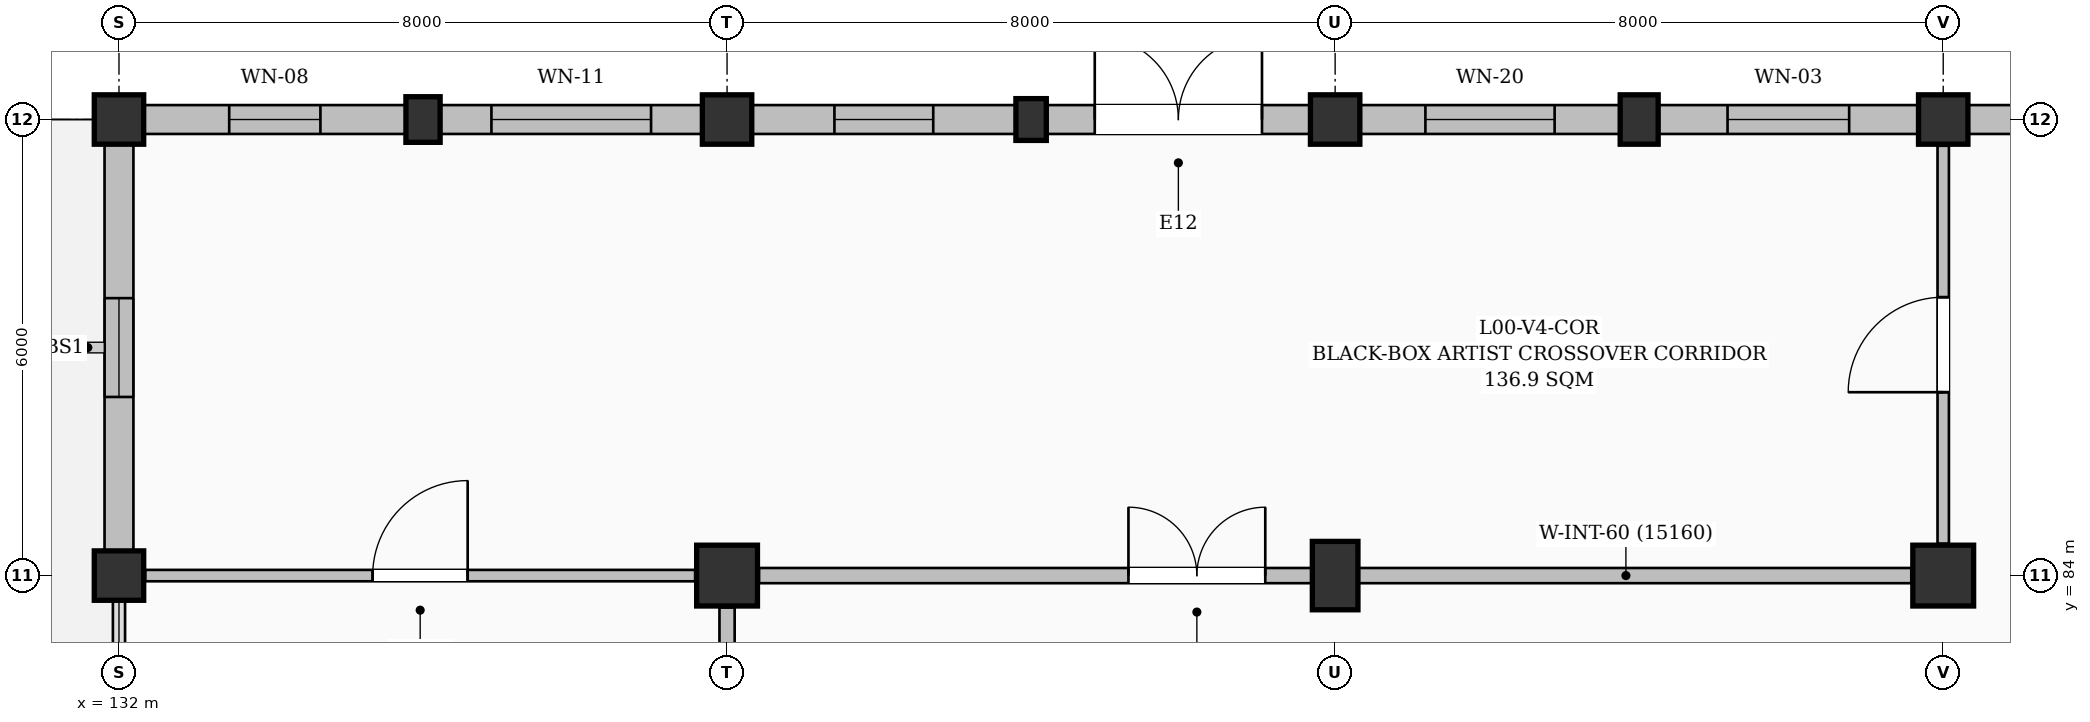
"""IFC4 building model, lengths in metres.
Left out: names, types, materials, properties, quantities, classifications, styles, units other than length and angle.
Written with IfcOpenShell. Run it as: python <this file> out.ifc"""

import sys

from ifc_helpers import new_model, si_unit, direction, frame, frame_2d, origin, origin_2d, place, context, subcontext, project, spatial, rectangle, extrude, element, fill, save


model = new_model("IFC4")
c1 = context("Model", 3, precision=1e-05, world=origin(), true_north=direction((0.0, 1.0)))
c2 = subcontext(c1, "Body", "Model", "MODEL_VIEW")
j1 = project(units=[si_unit("LENGTHUNIT", "METRE"), si_unit("PLANEANGLEUNIT", "RADIAN")], contexts=[c1])
p1 = place(None, origin())
s1 = spatial("IfcSite", under=j1, at=p1, CompositionType="ELEMENT")
p2 = place(p1, origin())
s2 = spatial("IfcBuilding", under=s1, at=p2, CompositionType="ELEMENT")
p3 = place(p2, origin())
s3 = spatial("IfcBuildingStorey", under=s2, at=p3, CompositionType="ELEMENT", Elevation=0.0)
for number, where, z_axis, x_axis in (
    (1, (132.0, 84.0, 0.0), (0.0, 0.0, 1.0), (1.0, 0.0, 0.0)),
    (2, (132.0, 90.0, 0.0), (0.0, 0.0, 1.0), (1.0, 0.0, 0.0)),
):
    element("IfcColumn", number, at=place(p3, frame(where, z_axis=z_axis, x_axis=x_axis)), inside=s3, PredefinedType="COLUMN", context=c2, shape_type="SweptSolid", body=[
        extrude(rectangle(XDim=0.65, YDim=0.65, at=origin_2d()), origin(), (0.0, 0.0, 1.0), 4.8),
    ])
p4 = place(p3, frame((136.0, 90.0, 0.0), z_axis=(0.0, 0.0, 1.0), x_axis=(1.0, 0.0, 0.0)))
e3 = element("IfcColumn", 3, at=p4, inside=s3, PredefinedType="PILASTER", context=c2, shape_type="SweptSolid", body=[
    extrude(rectangle(XDim=0.45, YDim=0.6, at=origin_2d()), origin(), (0.0, 0.0, 1.0), 4.8),
])
p5 = place(p3, frame((140.0, 84.0, 0.0), z_axis=(0.0, 0.0, 1.0), x_axis=(1.0, 0.0, 0.0)))
e4 = element("IfcColumn", 4, at=p5, inside=s3, PredefinedType="COLUMN", context=c2, shape_type="SweptSolid", body=[
    extrude(rectangle(XDim=0.8, YDim=0.8, at=origin_2d()), origin(), (0.0, 0.0, 1.0), 4.8),
])
p6 = place(p3, frame((140.0, 90.0, 0.0), z_axis=(0.0, 0.0, 1.0), x_axis=(1.0, 0.0, 0.0)))
e5 = element("IfcColumn", 5, at=p6, inside=s3, PredefinedType="COLUMN", context=c2, shape_type="SweptSolid", body=[
    extrude(rectangle(XDim=0.65, YDim=0.65, at=origin_2d()), origin(), (0.0, 0.0, 1.0), 4.8),
])
p7 = place(p3, frame((144.0, 90.0, 0.0), z_axis=(0.0, 0.0, 1.0), x_axis=(1.0, 0.0, 0.0)))
e6 = element("IfcColumn", 6, at=p7, inside=s3, PredefinedType="PILASTER", context=c2, shape_type="SweptSolid", body=[
    extrude(rectangle(XDim=0.4, YDim=0.55, at=origin_2d()), origin(), (0.0, 0.0, 1.0), 4.8),
])
p8 = place(p3, frame((148.0, 84.0, 0.0), z_axis=(0.0, 0.0, 1.0), x_axis=(1.0, 0.0, 0.0)))
e7 = element("IfcColumn", 7, at=p8, inside=s3, PredefinedType="COLUMN", context=c2, shape_type="SweptSolid", body=[
    extrude(rectangle(XDim=0.6, YDim=0.9, at=origin_2d()), origin(), (0.0, 0.0, 1.0), 4.8),
])
p9 = place(p3, frame((148.0, 90.0, 0.0), z_axis=(0.0, 0.0, 1.0), x_axis=(1.0, 0.0, 0.0)))
e8 = element("IfcColumn", 8, at=p9, inside=s3, PredefinedType="COLUMN", context=c2, shape_type="SweptSolid", body=[
    extrude(rectangle(XDim=0.65, YDim=0.65, at=origin_2d()), origin(), (0.0, 0.0, 1.0), 4.8),
])
p10 = place(p3, frame((152.0, 90.0, 0.0), z_axis=(0.0, 0.0, 1.0), x_axis=(1.0, 0.0, 0.0)))
e9 = element("IfcColumn", 9, at=p10, inside=s3, PredefinedType="PILASTER", context=c2, shape_type="SweptSolid", body=[
    extrude(rectangle(XDim=0.5, YDim=0.65, at=origin_2d()), origin(), (0.0, 0.0, 1.0), 4.8),
])
p11 = place(p3, frame((156.0, 84.0, 0.0), z_axis=(0.0, 0.0, 1.0), x_axis=(1.0, 0.0, 0.0)))
e10 = element("IfcColumn", 10, at=p11, inside=s3, PredefinedType="COLUMN", context=c2, shape_type="SweptSolid", body=[
    extrude(rectangle(XDim=0.8, YDim=0.8, at=origin_2d()), origin(), (0.0, 0.0, 1.0), 4.8),
])
p12 = place(p3, frame((156.0, 90.0, 0.0), z_axis=(0.0, 0.0, 1.0), x_axis=(1.0, 0.0, 0.0)))
e11 = element("IfcColumn", 11, at=p12, inside=s3, PredefinedType="COLUMN", context=c2, shape_type="SweptSolid", body=[
    extrude(rectangle(XDim=0.65, YDim=0.65, at=origin_2d()), origin(), (0.0, 0.0, 1.0), 4.8),
])
p13 = place(p3, frame((132.0, 84.325, 0.0), z_axis=(0.0, 0.0, 1.0), x_axis=(0.0, 1.0, 0.0)))
e12 = element("IfcWall", 12, at=p13, inside=s3, PredefinedType="SOLIDWALL", context=c2, shape_type="SweptSolid", body=[
    extrude(rectangle(XDim=5.35, YDim=0.38, at=frame_2d((2.675, 0.0))), origin(), (0.0, 0.0, 1.0), 4.335),
])
p14 = place(p13, frame((2.025, 0.0, 0.95)))
e13 = element("IfcOpeningElement", 13, at=p14, cuts=e12, PredefinedType="OPENING", context=c2, shape_type="SweptSolid", body=[
    extrude(rectangle(XDim=1.3, YDim=1.4, at=frame_2d((0.65, 0.7))), frame((0.0, 0.2, 0.0), z_axis=(0.0, -1.0, 0.0), x_axis=(1.0, 0.0, 0.0)), (0.0, 0.0, 1.0), 0.4),
])
p15 = place(p3, frame((132.325, 90.0, 0.0), z_axis=(0.0, 0.0, 1.0), x_axis=(1.0, 0.0, 0.0)))
e14 = element("IfcWall", 14, at=p15, inside=s3, PredefinedType="SOLIDWALL", context=c2, shape_type="SweptSolid", body=[
    extrude(rectangle(XDim=3.45, YDim=0.38, at=frame_2d((1.725, 0.0))), origin(), (0.0, 0.0, 1.0), 4.035),
])
p16 = place(p15, frame((1.125, 0.0, 0.95)))
e15 = element("IfcOpeningElement", 15, at=p16, cuts=e14, PredefinedType="OPENING", context=c2, shape_type="SweptSolid", body=[
    extrude(rectangle(XDim=1.2, YDim=1.5, at=frame_2d((0.6, 0.75))), frame((0.0, 0.2, 0.0), z_axis=(0.0, -1.0, 0.0), x_axis=(1.0, 0.0, 0.0)), (0.0, 0.0, 1.0), 0.4),
])
p17 = place(p3, frame((136.225, 90.0, 0.0), z_axis=(0.0, 0.0, 1.0), x_axis=(1.0, 0.0, 0.0)))
e16 = element("IfcWall", 16, at=p17, inside=s3, PredefinedType="SOLIDWALL", context=c2, shape_type="SweptSolid", body=[
    extrude(rectangle(XDim=3.45, YDim=0.38, at=frame_2d((1.725, 0.0))), origin(), (0.0, 0.0, 1.0), 4.035),
])
p18 = place(p17, frame((0.675, 0.0, 0.95)))
e17 = element("IfcOpeningElement", 17, at=p18, cuts=e16, PredefinedType="OPENING", context=c2, shape_type="SweptSolid", body=[
    extrude(rectangle(XDim=2.1, YDim=1.5, at=frame_2d((1.05, 0.75))), frame((0.0, 0.2, 0.0), z_axis=(0.0, -1.0, 0.0), x_axis=(1.0, 0.0, 0.0)), (0.0, 0.0, 1.0), 0.4),
])
p19 = place(p3, frame((140.325, 90.0, 0.0), z_axis=(0.0, 0.0, 1.0), x_axis=(1.0, 0.0, 0.0)))
e18 = element("IfcWall", 18, at=p19, inside=s3, PredefinedType="SOLIDWALL", context=c2, shape_type="SweptSolid", body=[
    extrude(rectangle(XDim=3.475, YDim=0.38, at=frame_2d((1.738, 0.0))), origin(), (0.0, 0.0, 1.0), 3.985),
])
p20 = place(p19, frame((1.087, 0.0, 0.95)))
e19 = element("IfcOpeningElement", 19, at=p20, cuts=e18, PredefinedType="OPENING", context=c2, shape_type="SweptSolid", body=[
    extrude(rectangle(XDim=1.3, YDim=1.4, at=frame_2d((0.65, 0.7))), frame((0.0, 0.2, 0.0), z_axis=(0.0, -1.0, 0.0), x_axis=(1.0, 0.0, 0.0)), (0.0, 0.0, 1.0), 0.4),
])
p21 = place(p3, frame((144.2, 90.0, 0.0), z_axis=(0.0, 0.0, 1.0), x_axis=(1.0, 0.0, 0.0)))
e20 = element("IfcWall", 20, at=p21, inside=s3, PredefinedType="SOLIDWALL", context=c2, shape_type="SweptSolid", body=[
    extrude(rectangle(XDim=3.475, YDim=0.38, at=frame_2d((1.738, 0.0))), origin(), (0.0, 0.0, 1.0), 3.985),
])
p22 = place(p21, frame((0.637, 0.0, 0.0)))
e21 = element("IfcOpeningElement", 21, at=p22, cuts=e20, PredefinedType="OPENING", context=c2, shape_type="SweptSolid", body=[
    extrude(rectangle(XDim=2.2, YDim=2.4, at=frame_2d((1.1, 1.2))), frame((0.0, 0.2, 0.0), z_axis=(0.0, -1.0, 0.0), x_axis=(1.0, 0.0, 0.0)), (0.0, 0.0, 1.0), 0.4),
])
p23 = place(p3, frame((148.325, 90.0, 0.0), z_axis=(0.0, 0.0, 1.0), x_axis=(1.0, 0.0, 0.0)))
e22 = element("IfcWall", 22, at=p23, inside=s3, PredefinedType="SOLIDWALL", context=c2, shape_type="SweptSolid", body=[
    extrude(rectangle(XDim=3.425, YDim=0.38, at=frame_2d((1.712, 0.0))), origin(), (0.0, 0.0, 1.0), 3.935),
])
p24 = place(p23, frame((0.863, 0.0, 0.95)))
e23 = element("IfcOpeningElement", 23, at=p24, cuts=e22, PredefinedType="OPENING", context=c2, shape_type="SweptSolid", body=[
    extrude(rectangle(XDim=1.7, YDim=2.0, at=frame_2d((0.85, 1.0))), frame((0.0, 0.2, 0.0), z_axis=(0.0, -1.0, 0.0), x_axis=(1.0, 0.0, 0.0)), (0.0, 0.0, 1.0), 0.4),
])
p25 = place(p3, frame((152.25, 90.0, 0.0), z_axis=(0.0, 0.0, 1.0), x_axis=(1.0, 0.0, 0.0)))
e24 = element("IfcWall", 24, at=p25, inside=s3, PredefinedType="SOLIDWALL", context=c2, shape_type="SweptSolid", body=[
    extrude(rectangle(XDim=3.425, YDim=0.38, at=frame_2d((1.712, 0.0))), origin(), (0.0, 0.0, 1.0), 3.935),
])
p26 = place(p25, frame((0.913, 0.0, 0.95)))
e25 = element("IfcOpeningElement", 25, at=p26, cuts=e24, PredefinedType="OPENING", context=c2, shape_type="SweptSolid", body=[
    extrude(rectangle(XDim=1.6, YDim=1.8, at=frame_2d((0.8, 0.9))), frame((0.0, 0.2, 0.0), z_axis=(0.0, -1.0, 0.0), x_axis=(1.0, 0.0, 0.0)), (0.0, 0.0, 1.0), 0.4),
])
p27 = place(p3, frame((156.325, 90.0, 0.0), z_axis=(0.0, 0.0, 1.0), x_axis=(1.0, 0.0, 0.0)))
e26 = element("IfcWall", 26, at=p27, inside=s3, PredefinedType="SOLIDWALL", context=c2, shape_type="SweptSolid", body=[
    extrude(rectangle(XDim=3.45, YDim=0.38, at=frame_2d((1.725, 0.0))), origin(), (0.0, 0.0, 1.0), 4.235),
])
p28 = place(p27, frame((0.625, 0.0, 0.95)))
e27 = element("IfcOpeningElement", 27, at=p28, cuts=e26, PredefinedType="OPENING", context=c2, shape_type="SweptSolid", body=[
    extrude(rectangle(XDim=2.2, YDim=1.8, at=frame_2d((1.1, 0.9))), frame((0.0, 0.2, 0.0), z_axis=(0.0, -1.0, 0.0), x_axis=(1.0, 0.0, 0.0)), (0.0, 0.0, 1.0), 0.4),
])
p29 = place(p3, frame((140.0, 68.42, 0.0), z_axis=(0.0, 0.0, 1.0), x_axis=(0.0, 1.0, 0.0)))
e28 = element("IfcWall", 28, at=p29, inside=s3, PredefinedType="PARTITIONING", context=c2, shape_type="SweptSolid", body=[
    extrude(rectangle(XDim=15.16, YDim=0.2, at=frame_2d((7.58, 0.0))), origin(), (0.0, 0.0, 1.0), 4.085),
])
p30 = place(p29, frame((4.861, 0.0, 0.0)))
e29 = element("IfcOpeningElement", 29, at=p30, cuts=e28, PredefinedType="OPENING", context=c2, shape_type="SweptSolid", body=[
    extrude(rectangle(XDim=1.8, YDim=2.35, at=frame_2d((0.9, 1.175))), frame((0.0, 0.11, 0.0), z_axis=(0.0, -1.0, 0.0), x_axis=(1.0, 0.0, 0.0)), (0.0, 0.0, 1.0), 0.22),
])
p31 = place(p3, frame((140.42, 84.0, 0.0), z_axis=(0.0, 0.0, 1.0), x_axis=(1.0, 0.0, 0.0)))
e30 = element("IfcWall", 30, at=p31, inside=s3, PredefinedType="PARTITIONING", context=c2, shape_type="SweptSolid", body=[
    extrude(rectangle(XDim=15.16, YDim=0.2, at=frame_2d((7.58, 0.0))), origin(), (0.0, 0.0, 1.0), 3.685),
])
p32 = place(p31, frame((4.861, 0.0, 0.0)))
e31 = element("IfcOpeningElement", 31, at=p32, cuts=e30, PredefinedType="OPENING", context=c2, shape_type="SweptSolid", body=[
    extrude(rectangle(XDim=1.8, YDim=2.35, at=frame_2d((0.9, 1.175))), frame((0.0, 0.11, 0.0), z_axis=(0.0, -1.0, 0.0), x_axis=(1.0, 0.0, 0.0)), (0.0, 0.0, 1.0), 0.22),
])
p33 = place(p3, frame((132.345, 84.0, 0.0), z_axis=(0.0, 0.0, 1.0), x_axis=(1.0, 0.0, 0.0)))
e32 = element("IfcWall", 32, at=p33, inside=s3, PredefinedType="PARTITIONING", context=c2, shape_type="SweptSolid", body=[
    extrude(rectangle(XDim=7.235, YDim=0.15, at=frame_2d((3.618, 0.0))), origin(), (0.0, 0.0, 1.0), 3.785),
])
p34 = place(p33, frame((2.992, 0.0, 0.0)))
e33 = element("IfcOpeningElement", 33, at=p34, cuts=e32, PredefinedType="OPENING", context=c2, shape_type="SweptSolid", body=[
    extrude(rectangle(XDim=1.25, YDim=2.15, at=frame_2d((0.625, 1.075))), frame((0.0, 0.085, 0.0), z_axis=(0.0, -1.0, 0.0), x_axis=(1.0, 0.0, 0.0)), (0.0, 0.0, 1.0), 0.17),
])
p35 = place(p3, frame((156.0, 84.42, 0.0), z_axis=(0.0, 0.0, 1.0), x_axis=(0.0, 1.0, 0.0)))
e34 = element("IfcWall", 34, at=p35, inside=s3, PredefinedType="PARTITIONING", context=c2, shape_type="SweptSolid", body=[
    extrude(rectangle(XDim=5.235, YDim=0.15, at=frame_2d((2.618, 0.0))), origin(), (0.0, 0.0, 1.0), 3.685),
])
p36 = place(p35, frame((1.992, 0.0, 0.0)))
e35 = element("IfcOpeningElement", 35, at=p36, cuts=e34, PredefinedType="OPENING", context=c2, shape_type="SweptSolid", body=[
    extrude(rectangle(XDim=1.25, YDim=2.15, at=frame_2d((0.625, 1.075))), frame((0.0, 0.085, 0.0), z_axis=(0.0, -1.0, 0.0), x_axis=(1.0, 0.0, 0.0)), (0.0, 0.0, 1.0), 0.17),
])
p37 = place(p14, origin())
e36 = element("IfcWindow", 36, at=p37, inside=s3, PartitioningType="SINGLE_PANEL", PredefinedType="WINDOW", context=c2, shape_type="SweptSolid", body=[
    extrude(rectangle(XDim=1.3, YDim=1.4, at=frame_2d((0.65, 0.7))), frame((0.0, 0.03, 0.0), z_axis=(0.0, -1.0, 0.0), x_axis=(1.0, 0.0, 0.0)), (0.0, 0.0, 1.0), 0.06),
])
fill(e13, e36)
p38 = place(p16, origin())
e37 = element("IfcWindow", 37, at=p38, inside=s3, PartitioningType="SINGLE_PANEL", PredefinedType="WINDOW", context=c2, shape_type="SweptSolid", body=[
    extrude(rectangle(XDim=1.2, YDim=1.5, at=frame_2d((0.6, 0.75))), frame((0.0, 0.03, 0.0), z_axis=(0.0, -1.0, 0.0), x_axis=(1.0, 0.0, 0.0)), (0.0, 0.0, 1.0), 0.06),
])
fill(e15, e37)
p39 = place(p18, origin())
e38 = element("IfcWindow", 38, at=p39, inside=s3, PartitioningType="TRIPLE_PANEL_VERTICAL", PredefinedType="WINDOW", context=c2, shape_type="SweptSolid", body=[
    extrude(rectangle(XDim=2.1, YDim=1.5, at=frame_2d((1.05, 0.75))), frame((0.0, 0.03, 0.0), z_axis=(0.0, -1.0, 0.0), x_axis=(1.0, 0.0, 0.0)), (0.0, 0.0, 1.0), 0.06),
])
fill(e17, e38)
p40 = place(p20, origin())
e39 = element("IfcWindow", 39, at=p40, inside=s3, PartitioningType="SINGLE_PANEL", PredefinedType="WINDOW", context=c2, shape_type="SweptSolid", body=[
    extrude(rectangle(XDim=1.3, YDim=1.4, at=frame_2d((0.65, 0.7))), frame((0.0, 0.03, 0.0), z_axis=(0.0, -1.0, 0.0), x_axis=(1.0, 0.0, 0.0)), (0.0, 0.0, 1.0), 0.06),
])
fill(e19, e39)
p41 = place(p22, origin())
e40 = element("IfcDoor", 40, at=p41, inside=s3, OperationType="DOUBLE_DOOR_SINGLE_SWING", PredefinedType="DOOR", context=c2, shape_type="SweptSolid", body=[
    extrude(rectangle(XDim=2.2, YDim=2.4, at=frame_2d((1.1, 1.2))), frame((0.0, 0.025, 0.0), z_axis=(0.0, -1.0, 0.0), x_axis=(1.0, 0.0, 0.0)), (0.0, 0.0, 1.0), 0.05),
])
fill(e21, e40)
p42 = place(p24, origin())
e41 = element("IfcWindow", 41, at=p42, inside=s3, PartitioningType="DOUBLE_PANEL_VERTICAL", PredefinedType="WINDOW", context=c2, shape_type="SweptSolid", body=[
    extrude(rectangle(XDim=1.7, YDim=2.0, at=frame_2d((0.85, 1.0))), frame((0.0, 0.03, 0.0), z_axis=(0.0, -1.0, 0.0), x_axis=(1.0, 0.0, 0.0)), (0.0, 0.0, 1.0), 0.06),
])
fill(e23, e41)
p43 = place(p26, origin())
e42 = element("IfcWindow", 42, at=p43, inside=s3, PartitioningType="DOUBLE_PANEL_VERTICAL", PredefinedType="WINDOW", context=c2, shape_type="SweptSolid", body=[
    extrude(rectangle(XDim=1.6, YDim=1.8, at=frame_2d((0.8, 0.9))), frame((0.0, 0.03, 0.0), z_axis=(0.0, -1.0, 0.0), x_axis=(1.0, 0.0, 0.0)), (0.0, 0.0, 1.0), 0.06),
])
fill(e25, e42)
p44 = place(p32, origin())
e43 = element("IfcDoor", 43, at=p44, inside=s3, OperationType="DOUBLE_DOOR_SINGLE_SWING", PredefinedType="DOOR", context=c2, shape_type="SweptSolid", body=[
    extrude(rectangle(XDim=1.8, YDim=2.35, at=frame_2d((0.9, 1.175))), frame((0.0, 0.025, 0.0), z_axis=(0.0, -1.0, 0.0), x_axis=(1.0, 0.0, 0.0)), (0.0, 0.0, 1.0), 0.05),
])
fill(e31, e43)
p45 = place(p34, origin())
e44 = element("IfcDoor", 44, at=p45, inside=s3, OperationType="SINGLE_SWING_RIGHT", PredefinedType="DOOR", context=c2, shape_type="SweptSolid", body=[
    extrude(rectangle(XDim=1.25, YDim=2.15, at=frame_2d((0.625, 1.075))), frame((0.0, 0.025, 0.0), z_axis=(0.0, -1.0, 0.0), x_axis=(1.0, 0.0, 0.0)), (0.0, 0.0, 1.0), 0.05),
])
fill(e33, e44)
p46 = place(p36, origin())
e45 = element("IfcDoor", 45, at=p46, inside=s3, OperationType="SINGLE_SWING_LEFT", PredefinedType="DOOR", context=c2, shape_type="SweptSolid", body=[
    extrude(rectangle(XDim=1.25, YDim=2.15, at=frame_2d((0.625, 1.075))), frame((0.0, 0.025, 0.0), z_axis=(0.0, -1.0, 0.0), x_axis=(1.0, 0.0, 0.0)), (0.0, 0.0, 1.0), 0.05),
])
fill(e35, e45)
save(model, sys.argv[1])
